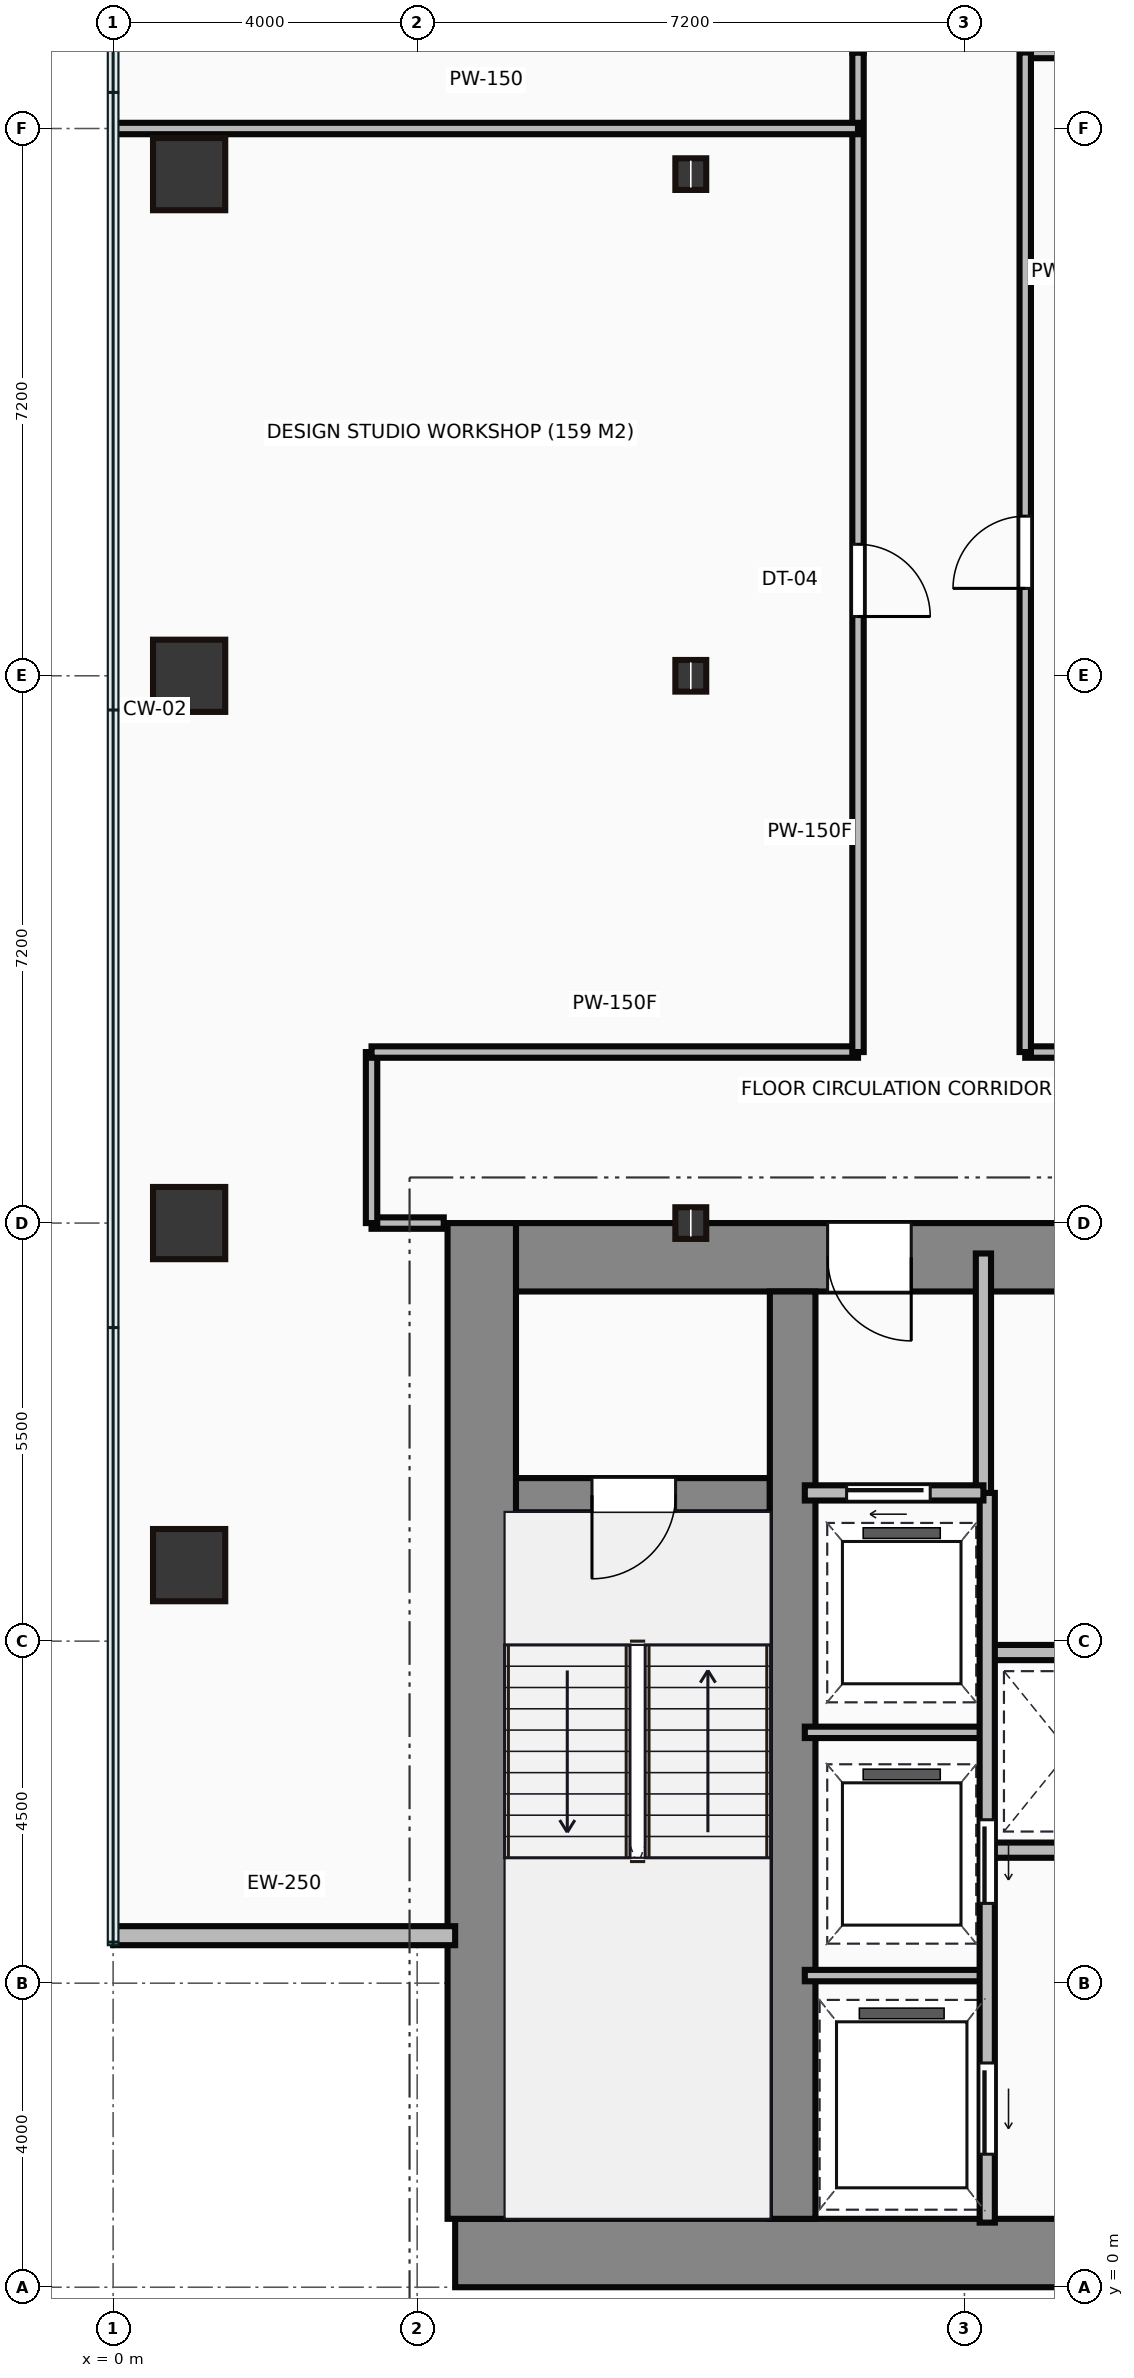
"""IFC4 building model, lengths in metres.
Left out: names, types, materials, properties, quantities, classifications, styles, units other than length and angle.
Written with IfcOpenShell. Run it as: python <this file> out.ifc"""

import sys

from ifc_helpers import new_model, si_unit, direction, frame, frame_2d, origin, origin_2d, place, context, subcontext, project, spatial, rectangle, hollow_rectangle, i_section, extrude, source, transform, mapped, element, fill, save


model = new_model("IFC4")
c1 = context("Model", 3, precision=1e-05, world=origin(), true_north=direction((0.0, 1.0)))
c2 = subcontext(c1, "Body", "Model", "MODEL_VIEW")
j1 = project(units=[si_unit("LENGTHUNIT", "METRE"), si_unit("PLANEANGLEUNIT", "RADIAN")], contexts=[c1])
p1 = place(None, origin())
s1 = spatial("IfcSite", under=j1, at=p1, CompositionType="ELEMENT")
p2 = place(p1, origin())
s2 = spatial("IfcBuilding", under=s1, at=p2, CompositionType="ELEMENT")
p3 = place(p2, frame((0.0, 0.0, 36.15)))
s3 = spatial("IfcBuildingStorey", under=s2, at=p3, CompositionType="ELEMENT", Elevation=36.15)
m1 = source(origin(), c2, "Body", "SweptSolid", [
    extrude(rectangle(XDim=29.5, YDim=0.9, at=frame_2d((14.75, 0.0))), origin(), (0.0, 0.0, 1.0), 3.65),
])
p4 = place(p3, frame((4.5, 0.45, 0.0), z_axis=(0.0, 0.0, 1.0), x_axis=(1.0, 0.0, 0.0)))
e1 = element("IfcWall", 1, at=p4, inside=s3, PredefinedType="SHEAR", context=c2, shape_type="MappedRepresentation", body=[
    mapped(m1, transform((0.0, 0.0, 0.0))),
])
m2 = source(origin(), c2, "Body", "SweptSolid", [
    extrude(rectangle(XDim=13.1, YDim=0.9, at=frame_2d((6.55, 0.0))), origin(), (0.0, 0.0, 1.0), 3.65),
])
p5 = place(p3, frame((4.85, 0.9, 0.0), z_axis=(0.0, 0.0, 1.0), x_axis=(0.0, 1.0, 0.0)))
e2 = element("IfcWall", 2, at=p5, inside=s3, PredefinedType="SHEAR", context=c2, shape_type="MappedRepresentation", body=[
    mapped(m2, transform((0.0, 0.0, 0.0))),
])
m3 = source(origin(), c2, "Body", "SweptSolid", [
    extrude(rectangle(XDim=9.1, YDim=0.9, at=frame_2d((4.55, 0.0))), origin(), (0.0, 0.0, 1.0), 3.65),
])
p6 = place(p3, frame((5.3, 13.55, 0.0), z_axis=(0.0, 0.0, 1.0), x_axis=(1.0, 0.0, 0.0)))
e3 = element("IfcWall", 3, at=p6, inside=s3, PredefinedType="SHEAR", context=c2, shape_type="MappedRepresentation", body=[
    mapped(m3, transform((0.0, 0.0, 0.0))),
])
p7 = place(p6, frame((4.1, 0.0, 0.0)))
e4 = element("IfcOpeningElement", 4, at=p7, cuts=e3, PredefinedType="OPENING", context=c2, shape_type="SweptSolid", body=[
    extrude(rectangle(XDim=1.1, YDim=2.15, at=frame_2d((0.55, 1.075))), frame((0.0, 0.46, 0.0), z_axis=(0.0, -1.0, 0.0), x_axis=(1.0, 0.0, 0.0)), (0.0, 0.0, 1.0), 0.92),
])
m4 = source(origin(), c2, "Body", "SweptSolid", [
    extrude(rectangle(XDim=12.2, YDim=0.6, at=frame_2d((6.1, 0.0))), origin(), (0.0, 0.0, 1.0), 3.65),
])
p8 = place(p3, frame((8.94, 0.9, 0.0), z_axis=(0.0, 0.0, 1.0), x_axis=(0.0, 1.0, 0.0)))
e5 = element("IfcWall", 5, at=p8, inside=s3, PredefinedType="SHEAR", context=c2, shape_type="MappedRepresentation", body=[
    mapped(m4, transform((0.0, 0.0, 0.0))),
])
m5 = source(origin(), c2, "Body", "SweptSolid", [
    extrude(rectangle(XDim=3.39, YDim=0.45, at=frame_2d((1.695, 0.0))), origin(), (0.0, 0.0, 1.0), 3.65),
])
p9 = place(p3, frame((5.25, 10.42, 0.0), z_axis=(0.0, 0.0, 1.0), x_axis=(1.0, 0.0, 0.0)))
e6 = element("IfcWall", 6, at=p9, inside=s3, PredefinedType="SHEAR", context=c2, shape_type="MappedRepresentation", body=[
    mapped(m5, transform((0.0, 0.0, 0.0))),
])
p10 = place(p9, frame((1.05, 0.0, 0.0)))
e7 = element("IfcOpeningElement", 7, at=p10, cuts=e6, PredefinedType="OPENING", context=c2, shape_type="SweptSolid", body=[
    extrude(rectangle(XDim=1.1, YDim=2.15, at=frame_2d((0.55, 1.075))), frame((0.0, 0.235, 0.0), z_axis=(0.0, -1.0, 0.0), x_axis=(1.0, 0.0, 0.0)), (0.0, 0.0, 1.0), 0.47),
])
m6 = source(origin(), c2, "Body", "SweptSolid", [
    extrude(hollow_rectangle(XDim=0.95, YDim=0.95, WallThickness=0.045, at=origin_2d()), origin(), (0.0, 0.0, 1.0), 3.65),
])
for number, where, z_axis, x_axis in (
    (8, (1.0, 9.5, 0.0), (0.0, 0.0, 1.0), (1.0, 0.0, 0.0)),
    (9, (1.0, 14.0, 0.0), (0.0, 0.0, 1.0), (1.0, 0.0, 0.0)),
    (10, (1.0, 21.2, 0.0), (0.0, 0.0, 1.0), (1.0, 0.0, 0.0)),
    (11, (1.0, 27.8, 0.0), (0.0, 0.0, 1.0), (1.0, 0.0, 0.0)),
):
    element("IfcColumn", number, at=place(p3, frame(where, z_axis=z_axis, x_axis=x_axis)), inside=s3, PredefinedType="COLUMN", context=c2, shape_type="MappedRepresentation", body=[
        mapped(m6, transform((0.0, 0.0, 0.0))),
    ])
m7 = source(origin(), c2, "Body", "SweptSolid", [
    extrude(i_section(OverallWidth=0.406, OverallDepth=0.416, WebThickness=0.03, FlangeThickness=0.048, at=origin_2d()), origin(), (0.0, 0.0, 1.0), 3.65),
])
for number, where, z_axis, x_axis in (
    (12, (7.6, 14.0, 0.0), (0.0, 0.0, 1.0), (1.0, 0.0, 0.0)),
    (13, (7.6, 21.2, 0.0), (0.0, 0.0, 1.0), (1.0, 0.0, 0.0)),
    (14, (7.6, 27.8, 0.0), (0.0, 0.0, 1.0), (1.0, 0.0, 0.0)),
):
    element("IfcColumn", number, at=place(p3, frame(where, z_axis=z_axis, x_axis=x_axis)), inside=s3, PredefinedType="COLUMN", context=c2, shape_type="MappedRepresentation", body=[
        mapped(m7, transform((0.0, 0.0, 0.0))),
    ])
m8 = source(origin(), c2, "Body", "SweptSolid", [
    extrude(rectangle(XDim=4.5, YDim=0.25, at=frame_2d((2.25, 0.0))), origin(), (0.0, 0.0, 1.0), 3.4),
])
p11 = place(p3, frame((0.0, 4.625, 0.0), z_axis=(0.0, 0.0, 1.0), x_axis=(1.0, 0.0, 0.0)))
e15 = element("IfcWall", 15, at=p11, inside=s3, PredefinedType="STANDARD", context=c2, shape_type="MappedRepresentation", body=[
    mapped(m8, transform((0.0, 0.0, 0.0))),
])
m9 = source(origin(), c2, "Body", "SweptSolid", [
    extrude(rectangle(XDim=3.18, YDim=0.2, at=frame_2d((1.59, 0.0))), origin(), (0.0, 0.0, 1.0), 3.4),
])
p12 = place(p3, frame((11.45, 10.42, 0.0), z_axis=(0.0, 0.0, 1.0), x_axis=(0.0, 1.0, 0.0)))
e16 = element("IfcWall", 16, at=p12, inside=s3, PredefinedType="PARTITIONING", context=c2, shape_type="MappedRepresentation", body=[
    mapped(m9, transform((0.0, 0.0, 0.0))),
])
m10 = source(origin(), c2, "Body", "SweptSolid", [
    extrude(rectangle(XDim=2.35, YDim=0.2, at=frame_2d((1.175, 0.0))), origin(), (0.0, 0.0, 1.0), 3.4),
])
p13 = place(p3, frame((9.1, 10.45, 0.0), z_axis=(0.0, 0.0, 1.0), x_axis=(1.0, 0.0, 0.0)))
e17 = element("IfcWall", 17, at=p13, inside=s3, PredefinedType="PARTITIONING", context=c2, shape_type="MappedRepresentation", body=[
    mapped(m10, transform((0.0, 0.0, 0.0))),
])
p14 = place(p13, frame((0.55, 0.0, 0.0)))
e18 = element("IfcOpeningElement", 18, at=p14, cuts=e17, PredefinedType="OPENING", context=c2, shape_type="SweptSolid", body=[
    extrude(rectangle(XDim=1.1, YDim=2.15, at=frame_2d((0.55, 1.075))), frame((0.0, 0.11, 0.0), z_axis=(0.0, -1.0, 0.0), x_axis=(1.0, 0.0, 0.0)), (0.0, 0.0, 1.0), 0.22),
])
m11 = source(origin(), c2, "Body", "SweptSolid", [
    extrude(rectangle(XDim=9.6, YDim=0.2, at=frame_2d((4.8, 0.0))), origin(), (0.0, 0.0, 1.0), 3.4),
])
p15 = place(p3, frame((11.5, 0.85, 0.0), z_axis=(0.0, 0.0, 1.0), x_axis=(0.0, 1.0, 0.0)))
e19 = element("IfcWall", 19, at=p15, inside=s3, PredefinedType="PARTITIONING", context=c2, shape_type="MappedRepresentation", body=[
    mapped(m11, transform((0.0, 0.0, 0.0))),
])
p16 = place(p15, frame((4.2, 0.0, 0.0)))
e20 = element("IfcOpeningElement", 20, at=p16, cuts=e19, PredefinedType="OPENING", context=c2, shape_type="SweptSolid", body=[
    extrude(rectangle(XDim=1.1, YDim=2.15, at=frame_2d((0.55, 1.075))), frame((0.0, 0.11, 0.0), z_axis=(0.0, -1.0, 0.0), x_axis=(1.0, 0.0, 0.0)), (0.0, 0.0, 1.0), 0.22),
])
p17 = place(p15, frame((0.9, 0.0, 0.0)))
e21 = element("IfcOpeningElement", 21, at=p17, cuts=e19, PredefinedType="OPENING", context=c2, shape_type="SweptSolid", body=[
    extrude(rectangle(XDim=1.2, YDim=2.15, at=frame_2d((0.6, 1.075))), frame((0.0, 0.11, 0.0), z_axis=(0.0, -1.0, 0.0), x_axis=(1.0, 0.0, 0.0)), (0.0, 0.0, 1.0), 0.22),
])
m12 = source(origin(), c2, "Body", "SweptSolid", [
    extrude(rectangle(XDim=2.4, YDim=0.15, at=frame_2d((1.2, 0.0))), origin(), (0.0, 0.0, 1.0), 3.4),
])
for number, where, z_axis, x_axis in (
    (22, (9.1, 4.1, 0.0), (0.0, 0.0, 1.0), (1.0, 0.0, 0.0)),
    (23, (9.1, 7.3, 0.0), (0.0, 0.0, 1.0), (1.0, 0.0, 0.0)),
):
    element("IfcWall", number, at=place(p3, frame(where, z_axis=z_axis, x_axis=x_axis)), inside=s3, PredefinedType="PARTITIONING", context=c2, shape_type="MappedRepresentation", body=[
        mapped(m12, transform((0.0, 0.0, 0.0))),
    ])
m13 = source(origin(), c2, "Body", "SweptSolid", [
    extrude(rectangle(XDim=11.85, YDim=0.2, at=frame_2d((5.925, 0.0))), origin(), (0.0, 0.0, 1.0), 3.4),
])
for number, where, z_axis, x_axis in (
    (24, (11.55, 5.75, 0.0), (0.0, 0.0, 1.0), (1.0, 0.0, 0.0)),
    (25, (11.55, 8.35, 0.0), (0.0, 0.0, 1.0), (1.0, 0.0, 0.0)),
):
    element("IfcWall", number, at=place(p3, frame(where, z_axis=z_axis, x_axis=x_axis)), inside=s3, PredefinedType="PARTITIONING", context=c2, shape_type="MappedRepresentation", body=[
        mapped(m13, transform((0.0, 0.0, 0.0))),
    ])
m14 = source(origin(), c2, "Body", "SweptSolid", [
    extrude(rectangle(XDim=0.95, YDim=0.15, at=frame_2d((0.475, 0.0))), origin(), (0.0, 0.0, 1.0), 2.625),
])
p18 = place(p3, frame((4.35, 14.0, 0.0), z_axis=(0.0, 0.0, 1.0), x_axis=(-1.0, 0.0, 0.0)))
e26 = element("IfcWall", 26, at=p18, inside=s3, PredefinedType="PARTITIONING", context=c2, shape_type="MappedRepresentation", body=[
    mapped(m14, transform((0.0, 0.0, 0.0))),
])
m15 = source(origin(), c2, "Body", "SweptSolid", [
    extrude(rectangle(XDim=2.25, YDim=0.15, at=frame_2d((1.125, 0.0))), origin(), (0.0, 0.0, 1.0), 3.4),
])
p19 = place(p3, frame((3.4, 14.0, 0.0), z_axis=(0.0, 0.0, 1.0), x_axis=(0.0, 1.0, 0.0)))
e27 = element("IfcWall", 27, at=p19, inside=s3, PredefinedType="PARTITIONING", context=c2, shape_type="MappedRepresentation", body=[
    mapped(m15, transform((0.0, 0.0, 0.0))),
])
m16 = source(origin(), c2, "Body", "SweptSolid", [
    extrude(rectangle(XDim=6.4, YDim=0.15, at=frame_2d((3.2, 0.0))), origin(), (0.0, 0.0, 1.0), 3.4),
])
p20 = place(p3, frame((3.4, 16.25, 0.0), z_axis=(0.0, 0.0, 1.0), x_axis=(1.0, 0.0, 0.0)))
e28 = element("IfcWall", 28, at=p20, inside=s3, PredefinedType="PARTITIONING", context=c2, shape_type="MappedRepresentation", body=[
    mapped(m16, transform((0.0, 0.0, 0.0))),
])
m17 = source(origin(), c2, "Body", "SweptSolid", [
    extrude(rectangle(XDim=13.15, YDim=0.15, at=frame_2d((6.575, 0.0))), origin(), (0.0, 0.0, 1.0), 3.4),
])
p21 = place(p3, frame((9.8, 16.25, 0.0), z_axis=(0.0, 0.0, 1.0), x_axis=(0.0, 1.0, 0.0)))
e29 = element("IfcWall", 29, at=p21, inside=s3, PredefinedType="PARTITIONING", context=c2, shape_type="MappedRepresentation", body=[
    mapped(m17, transform((0.0, 0.0, 0.0))),
])
p22 = place(p21, frame((5.73, 0.0, 0.0)))
e30 = element("IfcOpeningElement", 30, at=p22, cuts=e29, PredefinedType="OPENING", context=c2, shape_type="SweptSolid", body=[
    extrude(rectangle(XDim=0.95, YDim=2.15, at=frame_2d((0.475, 1.075))), frame((0.0, 0.085, 0.0), z_axis=(0.0, -1.0, 0.0), x_axis=(1.0, 0.0, 0.0)), (0.0, 0.0, 1.0), 0.17),
])
m18 = source(origin(), c2, "Body", "SweptSolid", [
    extrude(rectangle(XDim=2.05, YDim=0.15, at=frame_2d((1.025, 0.0))), origin(), (0.0, 0.0, 1.0), 3.4),
])
p23 = place(p3, frame((9.8, 29.4, 0.0), z_axis=(0.0, 0.0, 1.0), x_axis=(0.0, 1.0, 0.0)))
e31 = element("IfcWall", 31, at=p23, inside=s3, PredefinedType="PARTITIONING", context=c2, shape_type="MappedRepresentation", body=[
    mapped(m18, transform((0.0, 0.0, 0.0))),
])
p24 = place(p23, frame((0.55, 0.0, 0.0)))
e32 = element("IfcOpeningElement", 32, at=p24, cuts=e31, PredefinedType="OPENING", context=c2, shape_type="SweptSolid", body=[
    extrude(rectangle(XDim=0.95, YDim=2.15, at=frame_2d((0.475, 1.075))), frame((0.0, 0.085, 0.0), z_axis=(0.0, -1.0, 0.0), x_axis=(1.0, 0.0, 0.0)), (0.0, 0.0, 1.0), 0.17),
])
m19 = source(origin(), c2, "Body", "SweptSolid", [
    extrude(rectangle(XDim=25.2, YDim=0.15, at=frame_2d((12.6, 0.0))), origin(), (0.0, 0.0, 1.0), 3.4),
])
p25 = place(p3, frame((12.0, 16.25, 0.0), z_axis=(0.0, 0.0, 1.0), x_axis=(1.0, 0.0, 0.0)))
e33 = element("IfcWall", 33, at=p25, inside=s3, PredefinedType="PARTITIONING", context=c2, shape_type="MappedRepresentation", body=[
    mapped(m19, transform((0.0, 0.0, 0.0))),
])
p26 = place(p25, frame((14.925, 0.0, 0.0)))
e34 = element("IfcOpeningElement", 34, at=p26, cuts=e33, PredefinedType="OPENING", context=c2, shape_type="SweptSolid", body=[
    extrude(rectangle(XDim=0.95, YDim=2.15, at=frame_2d((0.475, 1.075))), frame((0.0, 0.085, 0.0), z_axis=(0.0, -1.0, 0.0), x_axis=(1.0, 0.0, 0.0)), (0.0, 0.0, 1.0), 0.17),
])
p27 = place(p3, frame((37.2, 29.4, 0.0), z_axis=(0.0, 0.0, 1.0), x_axis=(-1.0, 0.0, 0.0)))
e35 = element("IfcWall", 35, at=p27, inside=s3, PredefinedType="PARTITIONING", context=c2, shape_type="MappedRepresentation", body=[
    mapped(m19, transform((0.0, 0.0, 0.0))),
])
p28 = place(p3, frame((12.0, 29.4, 0.0), z_axis=(0.0, 0.0, 1.0), x_axis=(0.0, -1.0, 0.0)))
e36 = element("IfcWall", 36, at=p28, inside=s3, PredefinedType="PARTITIONING", context=c2, shape_type="MappedRepresentation", body=[
    mapped(m17, transform((0.0, 0.0, 0.0))),
])
p29 = place(p28, frame((6.1, 0.0, 0.0)))
e37 = element("IfcOpeningElement", 37, at=p29, cuts=e36, PredefinedType="OPENING", context=c2, shape_type="SweptSolid", body=[
    extrude(rectangle(XDim=0.95, YDim=2.15, at=frame_2d((0.475, 1.075))), frame((0.0, 0.085, 0.0), z_axis=(0.0, -1.0, 0.0), x_axis=(1.0, 0.0, 0.0)), (0.0, 0.0, 1.0), 0.17),
])
m20 = source(origin(), c2, "Body", "SweptSolid", [
    extrude(rectangle(XDim=9.78, YDim=0.15, at=frame_2d((4.89, 0.0))), origin(), (0.0, 0.0, 1.0), 3.4),
])
p30 = place(p3, frame((0.02, 28.4, 0.0), z_axis=(0.0, 0.0, 1.0), x_axis=(1.0, 0.0, 0.0)))
e38 = element("IfcWall", 38, at=p30, inside=s3, PredefinedType="PARTITIONING", context=c2, shape_type="MappedRepresentation", body=[
    mapped(m20, transform((0.0, 0.0, 0.0))),
])
m21 = source(origin(), c2, "Body", "SweptSolid", [
    extrude(rectangle(XDim=1.1, YDim=2.15, at=frame_2d((0.55, 1.075))), frame((0.0, 0.025, 0.0), z_axis=(0.0, -1.0, 0.0), x_axis=(1.0, 0.0, 0.0)), (0.0, 0.0, 1.0), 0.05),
])
p31 = place(p10, frame((1.1, 0.0, 0.0), z_axis=(0.0, 0.0, 1.0), x_axis=(-1.0, 0.0, 0.0)))
e39 = element("IfcDoor", 39, at=p31, inside=s3, OperationType="SINGLE_SWING_LEFT", PredefinedType="DOOR", context=c2, shape_type="MappedRepresentation", body=[
    mapped(m21, transform((0.0, 0.0, 0.0))),
])
fill(e7, e39)
p32 = place(p7, origin())
e40 = element("IfcDoor", 40, at=p32, inside=s3, OperationType="SINGLE_SWING_RIGHT", PredefinedType="DOOR", context=c2, shape_type="MappedRepresentation", body=[
    mapped(m21, transform((0.0, 0.0, 0.0))),
])
fill(e4, e40)
p33 = place(p14, origin())
e41 = element("IfcDoor", 41, at=p33, inside=s3, OperationType="SLIDING_TO_LEFT", PredefinedType="DOOR", context=c2, shape_type="MappedRepresentation", body=[
    mapped(m21, transform((0.0, 0.0, 0.0))),
])
fill(e18, e41)
p34 = place(p16, frame((1.1, 0.0, 0.0), z_axis=(0.0, 0.0, 1.0), x_axis=(-1.0, 0.0, 0.0)))
e42 = element("IfcDoor", 42, at=p34, inside=s3, OperationType="SLIDING_TO_LEFT", PredefinedType="DOOR", context=c2, shape_type="MappedRepresentation", body=[
    mapped(m21, transform((0.0, 0.0, 0.0))),
])
fill(e20, e42)
m22 = source(origin(), c2, "Body", "SweptSolid", [
    extrude(rectangle(XDim=1.2, YDim=2.15, at=frame_2d((0.6, 1.075))), frame((0.0, 0.025, 0.0), z_axis=(0.0, -1.0, 0.0), x_axis=(1.0, 0.0, 0.0)), (0.0, 0.0, 1.0), 0.05),
])
p35 = place(p17, frame((1.2, 0.0, 0.0), z_axis=(0.0, 0.0, 1.0), x_axis=(-1.0, 0.0, 0.0)))
e43 = element("IfcDoor", 43, at=p35, inside=s3, OperationType="SLIDING_TO_LEFT", PredefinedType="DOOR", context=c2, shape_type="MappedRepresentation", body=[
    mapped(m22, transform((0.0, 0.0, 0.0))),
])
fill(e21, e43)
m23 = source(origin(), c2, "Body", "SweptSolid", [
    extrude(rectangle(XDim=0.95, YDim=2.15, at=frame_2d((0.475, 1.075))), frame((0.0, 0.025, 0.0), z_axis=(0.0, -1.0, 0.0), x_axis=(1.0, 0.0, 0.0)), (0.0, 0.0, 1.0), 0.05),
])
p36 = place(p22, origin())
e44 = element("IfcDoor", 44, at=p36, inside=s3, OperationType="SINGLE_SWING_LEFT", PredefinedType="DOOR", context=c2, shape_type="MappedRepresentation", body=[
    mapped(m23, transform((0.0, 0.0, 0.0))),
])
fill(e30, e44)
p37 = place(p29, origin())
e45 = element("IfcDoor", 45, at=p37, inside=s3, OperationType="SINGLE_SWING_RIGHT", PredefinedType="DOOR", context=c2, shape_type="MappedRepresentation", body=[
    mapped(m23, transform((0.0, 0.0, 0.0))),
])
fill(e37, e45)
save(model, sys.argv[1])
